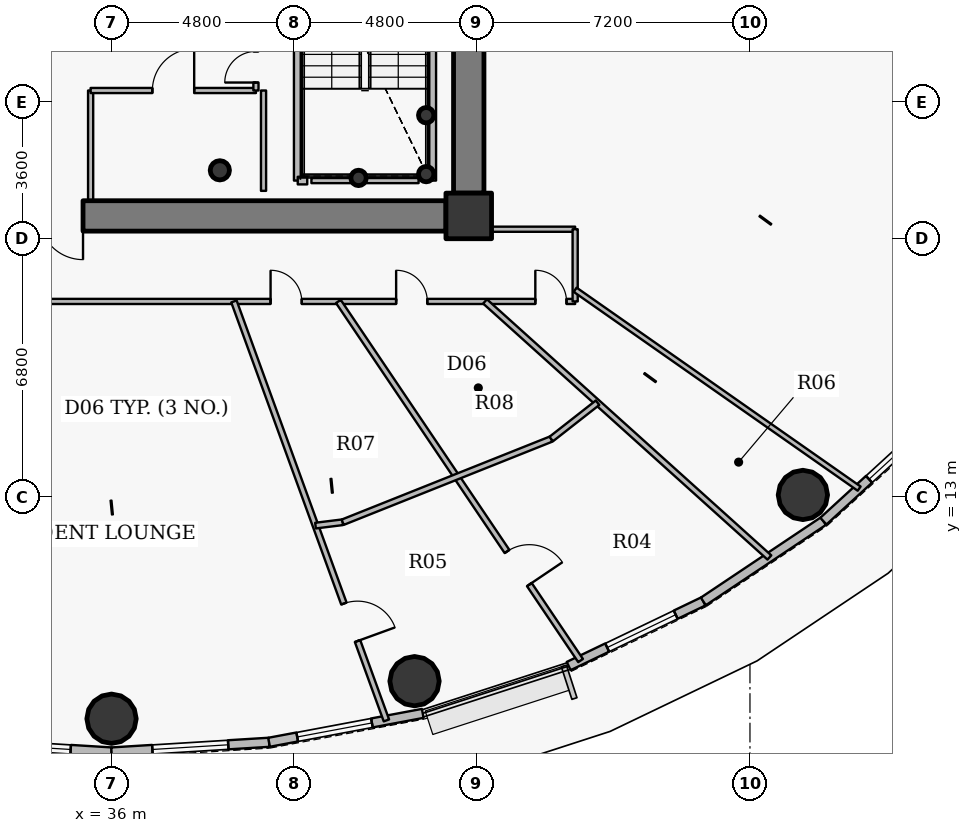
"""IFC4 building model, lengths in metres.
Left out: names, types, materials, properties, quantities, classifications, styles, units other than length and angle.
Written with IfcOpenShell. Run it as: python <this file> out.ifc"""

import sys

from ifc_helpers import new_model, si_unit, direction, frame, frame_2d, origin, origin_2d, place, context, subcontext, project, spatial, rectangle, hollow_circle, extrude, source, transform, mapped, element, fill, save


model = new_model("IFC4")
c1 = context("Model", 3, precision=1e-05, world=origin(), true_north=direction((0.0, 1.0)))
c2 = subcontext(c1, "Body", "Model", "MODEL_VIEW")
j1 = project(units=[si_unit("LENGTHUNIT", "METRE"), si_unit("PLANEANGLEUNIT", "RADIAN")], contexts=[c1])
p1 = place(None, origin())
s1 = spatial("IfcSite", under=j1, at=p1, CompositionType="ELEMENT")
p2 = place(p1, origin())
s2 = spatial("IfcBuilding", under=s1, at=p2, CompositionType="ELEMENT")
p3 = place(p2, frame((0.0, 0.0, 151.35)))
s3 = spatial("IfcBuildingStorey", under=s2, at=p3, CompositionType="ELEMENT", Elevation=151.35)
p4 = place(p3, frame((45.4, 20.4, 0.0), z_axis=(0.0, 0.0, 1.0), x_axis=(1.0, 0.0, 0.0)))
e1 = element("IfcColumn", 1, at=p4, inside=s3, PredefinedType="COLUMN", context=c2, shape_type="SweptSolid", body=[
    extrude(rectangle(XDim=1.2, YDim=1.2, at=origin_2d()), origin(), (0.0, 0.0, 1.0), 4.8),
])
p5 = place(p3, frame((38.85, 21.6, 0.0), z_axis=(0.0, 0.0, 1.0), x_axis=(1.0, 0.0, 0.0)))
e2 = element("IfcColumn", 2, at=p5, inside=s3, PredefinedType="COLUMN", context=c2, shape_type="SweptSolid", body=[
    extrude(hollow_circle(Radius=0.254, WallThickness=0.02, at=origin_2d()), origin(), (0.0, 0.0, 1.0), 4.8),
])
for number, where, z_axis, x_axis in (
    (3, (44.28, 21.5, 0.0), (0.0, 0.0, 1.0), (1.0, 0.0, 0.0)),
    (4, (44.28, 23.05, 0.0), (0.0, 0.0, 1.0), (1.0, 0.0, 0.0)),
    (5, (42.5, 21.4, 0.0), (0.0, 0.0, 1.0), (1.0, 0.0, 0.0)),
):
    element("IfcColumn", number, at=place(p3, frame(where, z_axis=z_axis, x_axis=x_axis)), inside=s3, PredefinedType="COLUMN", context=c2, shape_type="SweptSolid", body=[
        extrude(hollow_circle(Radius=0.203, WallThickness=0.016, at=origin_2d()), origin(), (0.0, 0.0, 1.0), 4.8),
    ])
p6 = place(p3, frame((45.4, 33.0, 0.0), z_axis=(0.0, 0.0, 1.0), x_axis=(0.0, -1.0, 0.0)))
e6 = element("IfcWall", 6, at=p6, inside=s3, PredefinedType="SHEAR", context=c2, shape_type="SweptSolid", body=[
    extrude(rectangle(XDim=12.0, YDim=0.8, at=frame_2d((6.0, 0.0))), origin(), (0.0, 0.0, 1.0), 4.0),
])
p7 = place(p3, frame((44.8, 20.4, 0.0), z_axis=(0.0, 0.0, 1.0), x_axis=(-1.0, 0.0, 0.0)))
e7 = element("IfcWall", 7, at=p7, inside=s3, PredefinedType="SHEAR", context=c2, shape_type="SweptSolid", body=[
    extrude(rectangle(XDim=17.6, YDim=0.8, at=frame_2d((8.8, 0.0))), origin(), (0.0, 0.0, 1.0), 4.0),
])
p8 = place(p7, frame((9.55, 0.0, 0.0)))
e8 = element("IfcOpeningElement", 8, at=p8, cuts=e7, PredefinedType="OPENING", context=c2, shape_type="SweptSolid", body=[
    extrude(rectangle(XDim=1.15, YDim=2.15, at=origin_2d()), frame((0.575, 0.41, 1.075), z_axis=(0.0, -1.0, 0.0), x_axis=(1.0, 0.0, 0.0)), (0.0, 0.0, 1.0), 0.82),
])
for number, where, z_axis, x_axis in (
    (9, (36.0, 7.17, -0.3), (0.0, 0.0, 1.0), (1.0, 0.0, 0.0)),
    (10, (43.973, 8.159, -0.3), (0.0, 0.0, 1.0), (1.0, 0.0, 0.0)),
    (11, (54.192, 13.058, -0.3), (0.0, 0.0, 1.0), (1.0, 0.0, 0.0)),
):
    element("IfcColumn", number, at=place(p3, frame(where, z_axis=z_axis, x_axis=x_axis)), inside=s3, PredefinedType="COLUMN", context=c2, shape_type="SweptSolid", body=[
        extrude(hollow_circle(Radius=0.65, WallThickness=0.04, at=origin_2d()), origin(), (0.0, 0.0, 1.0), 5.1),
    ])
p9 = place(p3, frame((36.0, 6.295, 0.0), z_axis=(0.0, 0.0, 1.0), x_axis=(-0.998104600619, 0.061540281305, 0.0)))
e12 = element("IfcWall", 12, at=p9, inside=s3, PredefinedType="SOLIDWALL", context=c2, shape_type="SweptSolid", body=[
    extrude(rectangle(XDim=4.154, YDim=0.24, at=frame_2d((2.077, 0.0))), origin(), (0.0, 0.0, 1.0), 4.55),
])
p10 = place(p9, frame((1.077, 0.0, 0.9)))
e13 = element("IfcOpeningElement", 13, at=p10, cuts=e12, PredefinedType="OPENING", context=c2, shape_type="SweptSolid", body=[
    extrude(rectangle(XDim=2.0, YDim=1.75, at=origin_2d()), frame((1.0, 0.13, 0.875), z_axis=(0.0, -1.0, 0.0), x_axis=(1.0, 0.0, 0.0)), (0.0, 0.0, 1.0), 0.26),
])
p11 = place(p3, frame((40.146, 6.551, 0.0), z_axis=(0.0, 0.0, 1.0), x_axis=(-0.998104600619, -0.061540281305, 0.0)))
e14 = element("IfcWall", 14, at=p11, inside=s3, PredefinedType="SOLIDWALL", context=c2, shape_type="SweptSolid", body=[
    extrude(rectangle(XDim=4.154, YDim=0.24, at=frame_2d((2.077, 0.0))), origin(), (0.0, 0.0, 1.0), 4.55),
])
p12 = place(p11, frame((1.077, 0.0, 0.9)))
e15 = element("IfcOpeningElement", 15, at=p12, cuts=e14, PredefinedType="OPENING", context=c2, shape_type="SweptSolid", body=[
    extrude(rectangle(XDim=2.0, YDim=1.75, at=origin_2d()), frame((1.0, 0.13, 0.875), z_axis=(0.0, -1.0, 0.0), x_axis=(1.0, 0.0, 0.0)), (0.0, 0.0, 1.0), 0.26),
])
p13 = place(p3, frame((44.189, 7.311, 0.0), z_axis=(0.0, 0.0, 1.0), x_axis=(-0.982788108205, -0.184736391573, 0.0)))
e16 = element("IfcWall", 16, at=p13, inside=s3, PredefinedType="SOLIDWALL", context=c2, shape_type="SweptSolid", body=[
    extrude(rectangle(XDim=4.114, YDim=0.24, at=frame_2d((2.057, 0.0))), origin(), (0.0, 0.0, 1.0), 4.55),
])
p14 = place(p13, frame((1.36, 0.0, 0.9)))
e17 = element("IfcOpeningElement", 17, at=p14, cuts=e16, PredefinedType="OPENING", context=c2, shape_type="SweptSolid", body=[
    extrude(rectangle(XDim=2.0, YDim=1.75, at=origin_2d()), frame((1.0, 0.13, 0.875), z_axis=(0.0, -1.0, 0.0), x_axis=(1.0, 0.0, 0.0)), (0.0, 0.0, 1.0), 0.26),
])
p15 = place(p3, frame((51.573, 10.257, 0.0), z_axis=(0.0, 0.0, 1.0), x_axis=(-0.901564733809, -0.432644231155, 0.0)))
e18 = element("IfcWall", 18, at=p15, inside=s3, PredefinedType="SOLIDWALL", context=c2, shape_type="SweptSolid", body=[
    extrude(rectangle(XDim=3.93, YDim=0.24, at=frame_2d((1.965, 0.0))), origin(), (0.0, 0.0, 1.0), 4.55),
])
p16 = place(p15, frame((0.807, 0.0, 0.9)))
e19 = element("IfcOpeningElement", 19, at=p16, cuts=e18, PredefinedType="OPENING", context=c2, shape_type="SweptSolid", body=[
    extrude(rectangle(XDim=2.0, YDim=1.75, at=origin_2d()), frame((1.0, 0.13, 0.875), z_axis=(0.0, -1.0, 0.0), x_axis=(1.0, 0.0, 0.0)), (0.0, 0.0, 1.0), 0.26),
])
p17 = place(p3, frame((54.732, 12.369, 0.0), z_axis=(0.0, 0.0, 1.0), x_axis=(-0.831228998277, -0.555930168657, 0.0)))
e20 = element("IfcWall", 20, at=p17, inside=s3, PredefinedType="SOLIDWALL", context=c2, shape_type="SweptSolid", body=[
    extrude(rectangle(XDim=3.8, YDim=0.24, at=frame_2d((1.9, 0.0))), origin(), (0.0, 0.0, 1.0), 4.55),
])
p18 = place(p3, frame((57.428, 14.842, 0.0), z_axis=(0.0, 0.0, 1.0), x_axis=(-0.737076565834, -0.675809245349, 0.0)))
e21 = element("IfcWall", 21, at=p18, inside=s3, PredefinedType="SOLIDWALL", context=c2, shape_type="SweptSolid", body=[
    extrude(rectangle(XDim=3.658, YDim=0.24, at=frame_2d((1.829, 0.0))), origin(), (0.0, 0.0, 1.0), 4.55),
])
p19 = place(p18, frame((0.778, 0.0, 0.9)))
e22 = element("IfcOpeningElement", 22, at=p19, cuts=e21, PredefinedType="OPENING", context=c2, shape_type="SweptSolid", body=[
    extrude(rectangle(XDim=1.25, YDim=1.65, at=origin_2d()), frame((0.625, 0.13, 0.825), z_axis=(0.0, -1.0, 0.0), x_axis=(1.0, 0.0, 0.0)), (0.0, 0.0, 1.0), 0.26),
])
p20 = place(p3, frame((24.35, 18.15, 0.0), z_axis=(0.0, 0.0, 1.0), x_axis=(1.0, 0.0, 0.0)))
e23 = element("IfcWall", 23, at=p20, inside=s3, PredefinedType="PARTITIONING", context=c2, shape_type="SweptSolid", body=[
    extrude(rectangle(XDim=23.85, YDim=0.135, at=frame_2d((11.925, 0.0))), origin(), (0.0, 0.0, 1.0), 3.985),
])
p21 = place(p20, frame((6.931, 0.0, 0.0)))
e24 = element("IfcOpeningElement", 24, at=p21, cuts=e23, PredefinedType="OPENING", context=c2, shape_type="SweptSolid", body=[
    extrude(rectangle(XDim=1.05, YDim=2.15, at=origin_2d()), frame((0.525, 0.078, 1.075), z_axis=(0.0, -1.0, 0.0), x_axis=(1.0, 0.0, 0.0)), (0.0, 0.0, 1.0), 0.155),
])
p22 = place(p20, frame((15.835, 0.0, 0.0)))
e25 = element("IfcOpeningElement", 25, at=p22, cuts=e23, PredefinedType="OPENING", context=c2, shape_type="SweptSolid", body=[
    extrude(rectangle(XDim=0.82, YDim=2.1, at=origin_2d()), frame((0.41, 0.078, 1.05), z_axis=(0.0, -1.0, 0.0), x_axis=(1.0, 0.0, 0.0)), (0.0, 0.0, 1.0), 0.155),
])
p23 = place(p20, frame((19.139, 0.0, 0.0)))
e26 = element("IfcOpeningElement", 26, at=p23, cuts=e23, PredefinedType="OPENING", context=c2, shape_type="SweptSolid", body=[
    extrude(rectangle(XDim=0.82, YDim=2.1, at=origin_2d()), frame((0.41, 0.078, 1.05), z_axis=(0.0, -1.0, 0.0), x_axis=(1.0, 0.0, 0.0)), (0.0, 0.0, 1.0), 0.155),
])
p24 = place(p20, frame((22.802, 0.0, 0.0)))
e27 = element("IfcOpeningElement", 27, at=p24, cuts=e23, PredefinedType="OPENING", context=c2, shape_type="SweptSolid", body=[
    extrude(rectangle(XDim=0.82, YDim=2.1, at=origin_2d()), frame((0.41, 0.078, 1.05), z_axis=(0.0, -1.0, 0.0), x_axis=(1.0, 0.0, 0.0)), (0.0, 0.0, 1.0), 0.155),
])
p25 = place(p3, frame((35.45, 20.8, 0.0), z_axis=(0.0, 0.0, 1.0), x_axis=(0.0, 1.0, 0.0)))
e28 = element("IfcWall", 28, at=p25, inside=s3, PredefinedType="PARTITIONING", context=c2, shape_type="SweptSolid", body=[
    extrude(rectangle(XDim=2.9, YDim=0.135, at=frame_2d((1.45, 0.0))), origin(), (0.0, 0.0, 1.0), 4.135),
])
p26 = place(p3, frame((35.45, 23.7, 0.0), z_axis=(0.0, 0.0, 1.0), x_axis=(1.0, 0.0, 0.0)))
e29 = element("IfcWall", 29, at=p26, inside=s3, PredefinedType="PARTITIONING", context=c2, shape_type="SweptSolid", body=[
    extrude(rectangle(XDim=4.35, YDim=0.135, at=frame_2d((2.175, 0.0))), origin(), (0.0, 0.0, 1.0), 4.135),
])
p27 = place(p26, frame((1.625, 0.0, 0.0)))
e30 = element("IfcOpeningElement", 30, at=p27, cuts=e29, PredefinedType="OPENING", context=c2, shape_type="SweptSolid", body=[
    extrude(rectangle(XDim=1.1, YDim=2.15, at=origin_2d()), frame((0.55, 0.078, 1.075), z_axis=(0.0, -1.0, 0.0), x_axis=(1.0, 0.0, 0.0)), (0.0, 0.0, 1.0), 0.155),
])
p28 = place(p3, frame((39.221, 18.15, 0.0), z_axis=(0.0, 0.0, 1.0), x_axis=(0.342025436493, -0.939690694214, 0.0)))
e31 = element("IfcWall", 31, at=p28, inside=s3, PredefinedType="PARTITIONING", context=c2, shape_type="SweptSolid", body=[
    extrude(rectangle(XDim=11.731, YDim=0.15, at=frame_2d((5.866, 0.0))), origin(), (0.0, 0.0, 1.0), 3.985),
])
p29 = place(p28, frame((8.459, 0.0, 0.0)))
e32 = element("IfcOpeningElement", 32, at=p29, cuts=e31, PredefinedType="OPENING", context=c2, shape_type="SweptSolid", body=[
    extrude(rectangle(XDim=1.05, YDim=2.15, at=origin_2d()), frame((0.525, 0.085, 1.075), z_axis=(0.0, -1.0, 0.0), x_axis=(1.0, 0.0, 0.0)), (0.0, 0.0, 1.0), 0.17),
])
p30 = place(p3, frame((39.8, 23.7, 0.0), z_axis=(0.0, 0.0, 1.0), x_axis=(0.0, 1.0, 0.0)))
e33 = element("IfcWall", 33, at=p30, inside=s3, PredefinedType="PARTITIONING", context=c2, shape_type="SweptSolid", body=[
    extrude(rectangle(XDim=1.75, YDim=0.135, at=frame_2d((0.875, 0.0))), origin(), (0.0, 0.0, 1.0), 4.55),
])
p31 = place(p30, frame((0.21, 0.0, 0.0)))
e34 = element("IfcOpeningElement", 34, at=p31, cuts=e33, PredefinedType="OPENING", context=c2, shape_type="SweptSolid", body=[
    extrude(rectangle(XDim=0.82, YDim=2.1, at=origin_2d()), frame((0.41, 0.078, 1.05), z_axis=(0.0, -1.0, 0.0), x_axis=(1.0, 0.0, 0.0)), (0.0, 0.0, 1.0), 0.155),
])
p32 = place(p3, frame((40.9, 21.33, 0.0), z_axis=(0.0, 0.0, 1.0), x_axis=(0.0, 1.0, 0.0)))
e35 = element("IfcWall", 35, at=p32, inside=s3, PredefinedType="PARTITIONING", context=c2, shape_type="SweptSolid", body=[
    extrude(rectangle(XDim=5.91, YDim=0.2, at=frame_2d((2.955, 0.0))), origin(), (0.0, 0.0, 1.0), 4.085),
])
p33 = place(p3, frame((40.9, 21.33, 0.0), z_axis=(0.0, 0.0, 1.0), x_axis=(1.0, 0.0, 0.0)))
e36 = element("IfcWall", 36, at=p33, inside=s3, PredefinedType="PARTITIONING", context=c2, shape_type="SweptSolid", body=[
    extrude(rectangle(XDim=0.25, YDim=0.2, at=frame_2d((0.125, 0.0))), origin(), (0.0, 0.0, 1.0), 4.085),
])
p34 = place(p3, frame((41.368, 12.251, 0.0), z_axis=(0.0, 0.0, 1.0), x_axis=(0.992361079, 0.123367292608, 0.0)))
e37 = element("IfcWall", 37, at=p34, inside=s3, PredefinedType="PARTITIONING", context=c2, shape_type="SweptSolid", body=[
    extrude(rectangle(XDim=0.72, YDim=0.15, at=frame_2d((0.36, 0.0))), origin(), (0.0, 0.0, 1.0), 3.985),
])
p35 = place(p3, frame((41.969, 18.15, 0.0), z_axis=(0.0, 0.0, 1.0), x_axis=(0.559195426667, -0.829035870632, 0.0)))
e38 = element("IfcWall", 38, at=p35, inside=s3, PredefinedType="PARTITIONING", context=c2, shape_type="SweptSolid", body=[
    extrude(rectangle(XDim=11.397, YDim=0.15, at=frame_2d((5.699, 0.0))), origin(), (0.0, 0.0, 1.0), 3.985),
])
p36 = place(p35, frame((7.936, 0.0, 0.0)))
e39 = element("IfcOpeningElement", 39, at=p36, cuts=e38, PredefinedType="OPENING", context=c2, shape_type="SweptSolid", body=[
    extrude(rectangle(XDim=1.05, YDim=2.15, at=origin_2d()), frame((0.525, 0.085, 1.075), z_axis=(0.0, -1.0, 0.0), x_axis=(1.0, 0.0, 0.0)), (0.0, 0.0, 1.0), 0.17),
])
p37 = place(p3, frame((42.083, 12.34, 0.0), z_axis=(0.0, 0.0, 1.0), x_axis=(0.928809762736, 0.370556911481, 0.0)))
e40 = element("IfcWall", 40, at=p37, inside=s3, PredefinedType="PARTITIONING", context=c2, shape_type="SweptSolid", body=[
    extrude(rectangle(XDim=5.908, YDim=0.15, at=frame_2d((2.954, 0.0))), origin(), (0.0, 0.0, 1.0), 3.985),
])
p38 = place(p3, frame((44.44, 21.33, 0.0), z_axis=(0.0, 0.0, 1.0), x_axis=(0.0, 1.0, 0.0)))
e41 = element("IfcWall", 41, at=p38, inside=s3, PredefinedType="PARTITIONING", context=c2, shape_type="SweptSolid", body=[
    extrude(rectangle(XDim=8.52, YDim=0.2, at=frame_2d((4.26, 0.0))), origin(), (0.0, 0.0, 1.0), 4.55),
])
p39 = place(p3, frame((45.829, 18.15, 0.0), z_axis=(0.0, 0.0, 1.0), x_axis=(0.743153057956, -0.669121463152, 0.0)))
e42 = element("IfcWall", 42, at=p39, inside=s3, PredefinedType="PARTITIONING", context=c2, shape_type="SweptSolid", body=[
    extrude(rectangle(XDim=10.068, YDim=0.15, at=frame_2d((5.034, 0.0))), origin(), (0.0, 0.0, 1.0), 3.985),
])
p40 = place(p3, frame((45.926, 20.05, 0.0), z_axis=(0.0, 0.0, 1.0), x_axis=(1.0, 0.0, 0.0)))
e43 = element("IfcWall", 43, at=p40, inside=s3, PredefinedType="PARTITIONING", context=c2, shape_type="SweptSolid", body=[
    extrude(rectangle(XDim=2.274, YDim=0.135, at=frame_2d((1.137, 0.0))), origin(), (0.0, 0.0, 1.0), 4.55),
])
p41 = place(p3, frame((47.57, 14.53, 0.0), z_axis=(0.0, 0.0, 1.0), x_axis=(0.787302028372, 0.616567527625, 0.0)))
e44 = element("IfcWall", 44, at=p41, inside=s3, PredefinedType="PARTITIONING", context=c2, shape_type="SweptSolid", body=[
    extrude(rectangle(XDim=1.549, YDim=0.15, at=frame_2d((0.774, 0.0))), origin(), (0.0, 0.0, 1.0), 4.55),
])
p42 = place(p3, frame((48.2, 18.15, 0.0), z_axis=(0.0, 0.0, 1.0), x_axis=(0.0, 1.0, 0.0)))
e45 = element("IfcWall", 45, at=p42, inside=s3, PredefinedType="PARTITIONING", context=c2, shape_type="SweptSolid", body=[
    extrude(rectangle(XDim=1.9, YDim=0.135, at=frame_2d((0.95, 0.0))), origin(), (0.0, 0.0, 1.0), 4.55),
])
p43 = place(p3, frame((48.2, 18.458, 0.0), z_axis=(0.0, 0.0, 1.0), x_axis=(0.819151444864, -0.573577292418, 0.0)))
e46 = element("IfcWall", 46, at=p43, inside=s3, PredefinedType="PARTITIONING", context=c2, shape_type="SweptSolid", body=[
    extrude(rectangle(XDim=9.122, YDim=0.135, at=frame_2d((4.561, 0.0))), origin(), (0.0, 0.0, 1.0), 3.985),
])
p44 = place(p3, frame((44.08, 21.33, 0.0), z_axis=(0.0, 0.0, 1.0), x_axis=(-1.0, 0.0, 0.0)))
e47 = element("IfcWall", 47, at=p44, inside=s3, PredefinedType="PARTITIONING", context=c2, shape_type="SweptSolid", body=[
    extrude(rectangle(XDim=2.82, YDim=0.135, at=frame_2d((1.41, 0.0))), origin(), (0.0, 0.0, 1.0), 4.085),
])
p45 = place(p3, frame((40.0, 23.7, 0.0), z_axis=(0.0, 0.0, 1.0), x_axis=(0.0, -1.0, 0.0)))
e48 = element("IfcWall", 48, at=p45, inside=s3, PredefinedType="PARTITIONING", context=c2, shape_type="SweptSolid", body=[
    extrude(rectangle(XDim=2.64, YDim=0.135, at=frame_2d((1.32, 0.0))), origin(), (0.0, 0.0, 1.0), 4.085),
])
p46 = place(p3, frame((44.81, 20.0, 0.0), z_axis=(0.0, 0.0, 1.0), x_axis=(1.0, 0.0, 0.0)))
e49 = element("IfcWall", 49, at=p46, inside=s3, PredefinedType="PARTITIONING", context=c2, shape_type="SweptSolid", body=[
    extrude(rectangle(XDim=0.99, YDim=0.135, at=frame_2d((0.495, 0.0))), origin(), (0.0, 0.0, 1.0), 3.985),
])
p47 = place(p3, frame((45.8, 20.308, 0.0), z_axis=(0.0, 0.0, 1.0), x_axis=(0.0, 1.0, 0.0)))
e50 = element("IfcWall", 50, at=p47, inside=s3, PredefinedType="PARTITIONING", context=c2, shape_type="SweptSolid", body=[
    extrude(rectangle(XDim=0.682, YDim=0.135, at=frame_2d((0.341, 0.0))), origin(), (0.0, 0.0, 1.0), 4.55),
])
m1 = source(origin(), c2, "Body", "SweptSolid", [
    extrude(rectangle(XDim=2.0, YDim=1.75, at=origin_2d()), frame((1.0, 0.03, 0.875), z_axis=(0.0, -1.0, 0.0), x_axis=(1.0, 0.0, 0.0)), (0.0, 0.0, 1.0), 0.06),
])
p48 = place(p10, origin())
e51 = element("IfcWindow", 51, at=p48, inside=s3, PartitioningType="DOUBLE_PANEL_VERTICAL", PredefinedType="WINDOW", context=c2, shape_type="MappedRepresentation", body=[
    mapped(m1, transform((0.0, 0.0, 0.0), x_axis=(1.0, 0.0, 0.0), y_axis=(0.0, 1.0, 0.0), z_axis=(0.0, 0.0, 1.0), scale=1.0)),
])
fill(e13, e51)
p49 = place(p12, origin())
e52 = element("IfcWindow", 52, at=p49, inside=s3, PartitioningType="DOUBLE_PANEL_VERTICAL", PredefinedType="WINDOW", context=c2, shape_type="MappedRepresentation", body=[
    mapped(m1, transform((0.0, 0.0, 0.0), x_axis=(1.0, 0.0, 0.0), y_axis=(0.0, 1.0, 0.0), z_axis=(0.0, 0.0, 1.0), scale=1.0)),
])
fill(e15, e52)
p50 = place(p14, origin())
e53 = element("IfcWindow", 53, at=p50, inside=s3, PartitioningType="DOUBLE_PANEL_VERTICAL", PredefinedType="WINDOW", context=c2, shape_type="MappedRepresentation", body=[
    mapped(m1, transform((0.0, 0.0, 0.0), x_axis=(1.0, 0.0, 0.0), y_axis=(0.0, 1.0, 0.0), z_axis=(0.0, 0.0, 1.0), scale=1.0)),
])
fill(e17, e53)
p51 = place(p16, origin())
e54 = element("IfcWindow", 54, at=p51, inside=s3, PartitioningType="DOUBLE_PANEL_VERTICAL", PredefinedType="WINDOW", context=c2, shape_type="MappedRepresentation", body=[
    mapped(m1, transform((0.0, 0.0, 0.0), x_axis=(1.0, 0.0, 0.0), y_axis=(0.0, 1.0, 0.0), z_axis=(0.0, 0.0, 1.0), scale=1.0)),
])
fill(e19, e54)
m2 = source(origin(), c2, "Body", "SweptSolid", [
    extrude(rectangle(XDim=1.25, YDim=1.65, at=origin_2d()), frame((0.625, 0.03, 0.825), z_axis=(0.0, -1.0, 0.0), x_axis=(1.0, 0.0, 0.0)), (0.0, 0.0, 1.0), 0.06),
])
p52 = place(p19, origin())
e55 = element("IfcWindow", 55, at=p52, inside=s3, PartitioningType="SINGLE_PANEL", PredefinedType="WINDOW", context=c2, shape_type="MappedRepresentation", body=[
    mapped(m2, transform((0.0, 0.0, 0.0), x_axis=(1.0, 0.0, 0.0), y_axis=(0.0, 1.0, 0.0), z_axis=(0.0, 0.0, 1.0), scale=1.0)),
])
fill(e22, e55)
m3 = source(origin(), c2, "Body", "SweptSolid", [
    extrude(rectangle(XDim=1.15, YDim=2.15, at=origin_2d()), frame((0.575, 0.025, 1.075), z_axis=(0.0, -1.0, 0.0), x_axis=(1.0, 0.0, 0.0)), (0.0, 0.0, 1.0), 0.05),
])
p53 = place(p8, origin())
e56 = element("IfcDoor", 56, at=p53, inside=s3, OperationType="SINGLE_SWING_LEFT", PredefinedType="DOOR", context=c2, shape_type="MappedRepresentation", body=[
    mapped(m3, transform((0.0, 0.0, 0.0), x_axis=(1.0, 0.0, 0.0), y_axis=(0.0, 1.0, 0.0), z_axis=(0.0, 0.0, 1.0), scale=1.0)),
])
fill(e8, e56)
m4 = source(origin(), c2, "Body", "SweptSolid", [
    extrude(rectangle(XDim=1.1, YDim=2.15, at=origin_2d()), frame((0.55, 0.025, 1.075), z_axis=(0.0, -1.0, 0.0), x_axis=(1.0, 0.0, 0.0)), (0.0, 0.0, 1.0), 0.05),
])
p54 = place(p27, origin())
e57 = element("IfcDoor", 57, at=p54, inside=s3, OperationType="SINGLE_SWING_RIGHT", PredefinedType="DOOR", context=c2, shape_type="MappedRepresentation", body=[
    mapped(m4, transform((0.0, 0.0, 0.0), x_axis=(1.0, 0.0, 0.0), y_axis=(0.0, 1.0, 0.0), z_axis=(0.0, 0.0, 1.0), scale=1.0)),
])
fill(e30, e57)
m5 = source(origin(), c2, "Body", "SweptSolid", [
    extrude(rectangle(XDim=0.82, YDim=2.1, at=origin_2d()), frame((0.41, 0.025, 1.05), z_axis=(0.0, -1.0, 0.0), x_axis=(1.0, 0.0, 0.0)), (0.0, 0.0, 1.0), 0.05),
])
p55 = place(p31, origin())
e58 = element("IfcDoor", 58, at=p55, inside=s3, OperationType="SINGLE_SWING_LEFT", PredefinedType="DOOR", context=c2, shape_type="MappedRepresentation", body=[
    mapped(m5, transform((0.0, 0.0, 0.0), x_axis=(1.0, 0.0, 0.0), y_axis=(0.0, 1.0, 0.0), z_axis=(0.0, 0.0, 1.0), scale=1.0)),
])
fill(e34, e58)
p56 = place(p22, origin())
e59 = element("IfcDoor", 59, at=p56, inside=s3, OperationType="SINGLE_SWING_LEFT", PredefinedType="DOOR", context=c2, shape_type="MappedRepresentation", body=[
    mapped(m5, transform((0.0, 0.0, 0.0), x_axis=(1.0, 0.0, 0.0), y_axis=(0.0, 1.0, 0.0), z_axis=(0.0, 0.0, 1.0), scale=1.0)),
])
fill(e25, e59)
m6 = source(origin(), c2, "Body", "SweptSolid", [
    extrude(rectangle(XDim=1.05, YDim=2.15, at=origin_2d()), frame((0.525, 0.025, 1.075), z_axis=(0.0, -1.0, 0.0), x_axis=(1.0, 0.0, 0.0)), (0.0, 0.0, 1.0), 0.05),
])
p57 = place(p29, origin())
e60 = element("IfcDoor", 60, at=p57, inside=s3, OperationType="SINGLE_SWING_RIGHT", PredefinedType="DOOR", context=c2, shape_type="MappedRepresentation", body=[
    mapped(m6, transform((0.0, 0.0, 0.0), x_axis=(1.0, 0.0, 0.0), y_axis=(0.0, 1.0, 0.0), z_axis=(0.0, 0.0, 1.0), scale=1.0)),
])
fill(e32, e60)
p58 = place(p23, origin())
e61 = element("IfcDoor", 61, at=p58, inside=s3, OperationType="SINGLE_SWING_LEFT", PredefinedType="DOOR", context=c2, shape_type="MappedRepresentation", body=[
    mapped(m5, transform((0.0, 0.0, 0.0), x_axis=(1.0, 0.0, 0.0), y_axis=(0.0, 1.0, 0.0), z_axis=(0.0, 0.0, 1.0), scale=1.0)),
])
fill(e26, e61)
p59 = place(p36, origin())
e62 = element("IfcDoor", 62, at=p59, inside=s3, OperationType="SINGLE_SWING_RIGHT", PredefinedType="DOOR", context=c2, shape_type="MappedRepresentation", body=[
    mapped(m6, transform((0.0, 0.0, 0.0), x_axis=(1.0, 0.0, 0.0), y_axis=(0.0, 1.0, 0.0), z_axis=(0.0, 0.0, 1.0), scale=1.0)),
])
fill(e39, e62)
p60 = place(p24, origin())
e63 = element("IfcDoor", 63, at=p60, inside=s3, OperationType="SINGLE_SWING_LEFT", PredefinedType="DOOR", context=c2, shape_type="MappedRepresentation", body=[
    mapped(m5, transform((0.0, 0.0, 0.0), x_axis=(1.0, 0.0, 0.0), y_axis=(0.0, 1.0, 0.0), z_axis=(0.0, 0.0, 1.0), scale=1.0)),
])
fill(e27, e63)
save(model, sys.argv[1])
